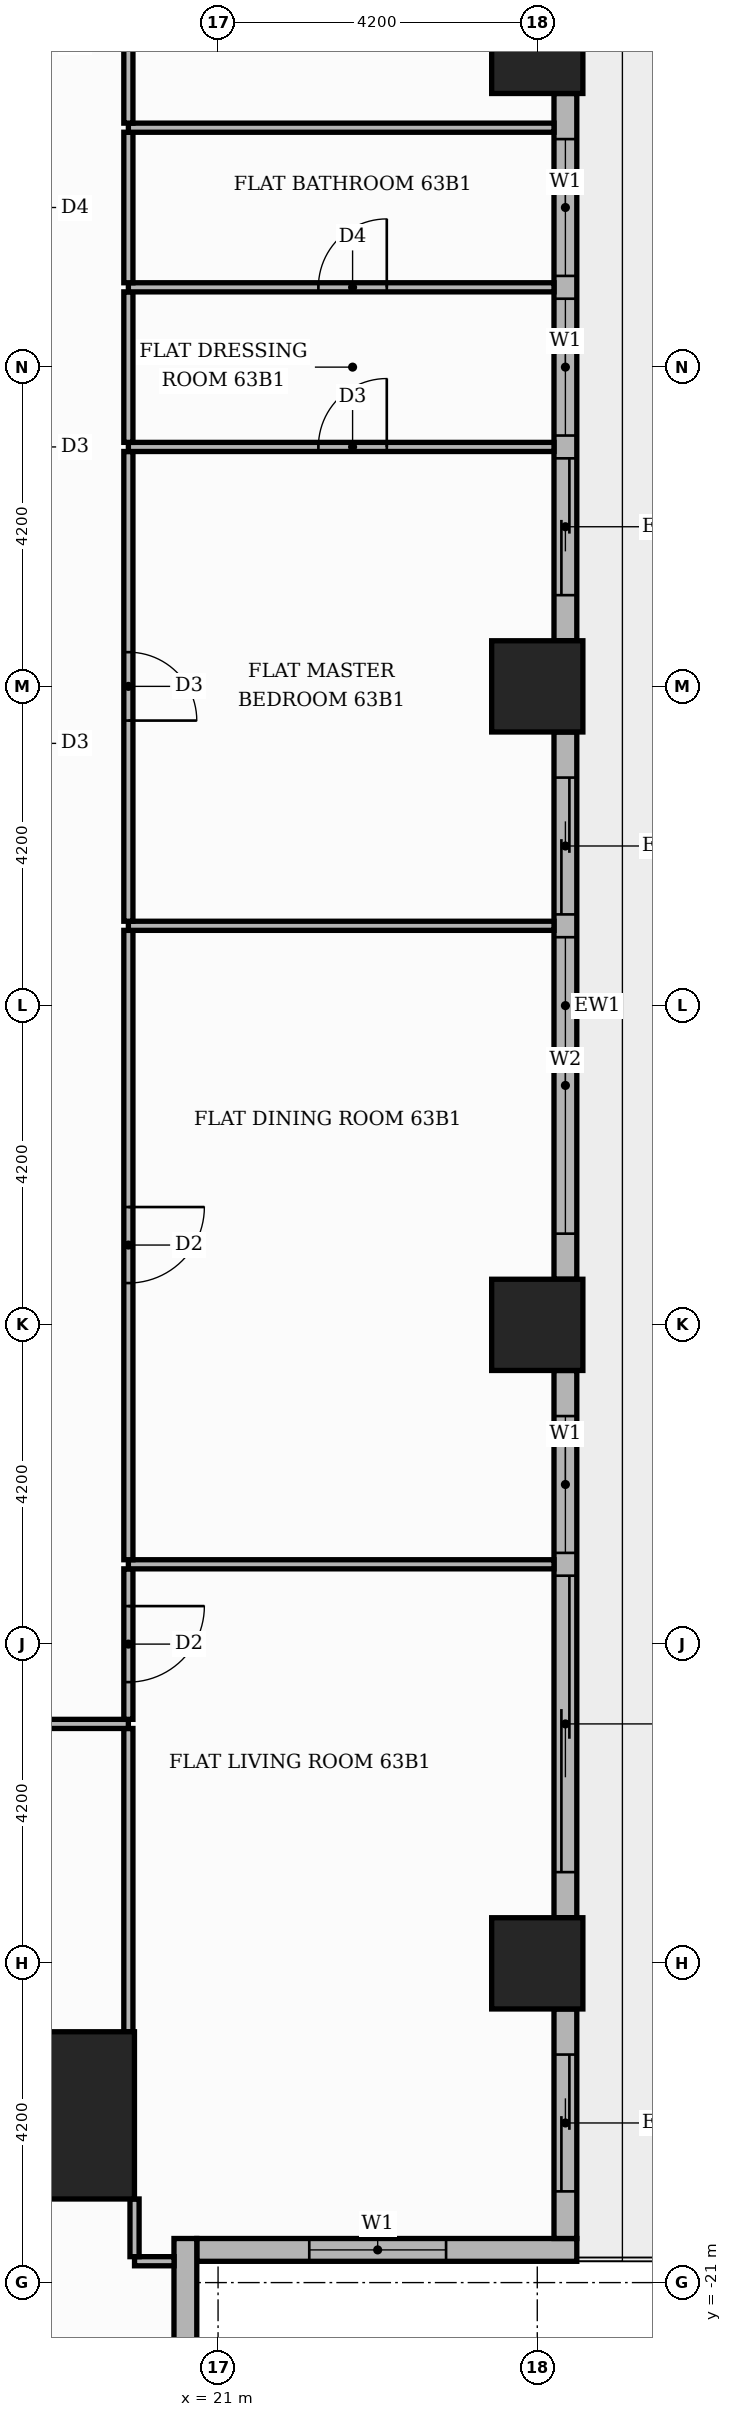
"""IFC4 building model, lengths in metres.
Left out: names, types, materials, properties, quantities, classifications, styles, units other than length and angle.
Written with IfcOpenShell. Run it as: python <this file> out.ifc"""

import sys

from ifc_helpers import new_model, si_unit, direction, frame, frame_2d, origin, origin_2d, place, context, subcontext, project, spatial, rectangle, extrude, element, fill, save


model = new_model("IFC4")
c1 = context("Model", 3, precision=1e-05, world=origin(), true_north=direction((0.0, 1.0)))
c2 = subcontext(c1, "Body", "Model", "MODEL_VIEW")
j1 = project(units=[si_unit("LENGTHUNIT", "METRE"), si_unit("PLANEANGLEUNIT", "RADIAN")], contexts=[c1])
p1 = place(None, origin())
s1 = spatial("IfcSite", under=j1, at=p1, CompositionType="ELEMENT")
p2 = place(p1, origin())
s2 = spatial("IfcBuilding", under=s1, at=p2, CompositionType="ELEMENT")
p3 = place(p2, frame((0.0, 0.0, 264.0)))
s3 = spatial("IfcBuildingStorey", under=s2, at=p3, CompositionType="ELEMENT", Elevation=264.0)
p4 = place(p3, frame((18.8, -18.8, 0.0), z_axis=(0.0, 0.0, 1.0), x_axis=(1.0, 0.0, 0.0)))
e1 = element("IfcColumn", 1, at=p4, inside=s3, PredefinedType="COLUMN", context=c2, shape_type="SweptSolid", body=[
    extrude(rectangle(XDim=2.2, YDim=2.2, at=origin_2d()), origin(), (0.0, 0.0, 1.0), 3.9),
])
for number, where, z_axis, x_axis in (
    (2, (25.2, 0.0, 0.0), (0.0, 0.0, 1.0), (1.0, 0.0, 0.0)),
    (3, (25.2, 8.4, 0.0), (0.0, 0.0, 1.0), (1.0, 0.0, 0.0)),
    (4, (25.2, -8.4, 0.0), (0.0, 0.0, 1.0), (1.0, 0.0, 0.0)),
    (5, (25.2, -16.8, 0.0), (0.0, 0.0, 1.0), (1.0, 0.0, 0.0)),
):
    element("IfcColumn", number, at=place(p3, frame(where, z_axis=z_axis, x_axis=x_axis)), inside=s3, PredefinedType="COLUMN", context=c2, shape_type="SweptSolid", body=[
        extrude(rectangle(XDim=1.2, YDim=1.2, at=origin_2d()), origin(), (0.0, 0.0, 1.0), 3.9),
    ])
p5 = place(p3, frame((20.72, -20.57, 0.0), z_axis=(0.0, 0.0, 1.0), x_axis=(1.0, 0.0, 0.0)))
e6 = element("IfcWall", 6, at=p5, inside=s3, PredefinedType="STANDARD", context=c2, shape_type="SweptSolid", body=[
    extrude(rectangle(XDim=5.0, YDim=0.3, at=frame_2d((2.5, 0.0))), origin(), (0.0, 0.0, 1.0), 3.48),
])
p6 = place(p5, frame((1.48, 0.0, 0.9)))
e7 = element("IfcOpeningElement", 7, at=p6, cuts=e6, PredefinedType="OPENING", context=c2, shape_type="SweptSolid", body=[
    extrude(rectangle(XDim=1.8, YDim=2.1, at=frame_2d((0.9, 1.05))), frame((0.0, 0.16, 0.0), z_axis=(0.0, -1.0, 0.0), x_axis=(1.0, 0.0, 0.0)), (0.0, 0.0, 1.0), 0.32),
])
p7 = place(p3, frame((25.57, -20.42, 0.0), z_axis=(0.0, 0.0, 1.0), x_axis=(0.0, 1.0, 0.0)))
e8 = element("IfcWall", 8, at=p7, inside=s3, PredefinedType="STANDARD", context=c2, shape_type="SweptSolid", body=[
    extrude(rectangle(XDim=3.02, YDim=0.3, at=frame_2d((1.51, 0.0))), origin(), (0.0, 0.0, 1.0), 3.48),
])
p8 = place(p7, frame((0.62, 0.0, 0.0)))
e9 = element("IfcOpeningElement", 9, at=p8, cuts=e8, PredefinedType="OPENING", context=c2, shape_type="SweptSolid", body=[
    extrude(rectangle(XDim=1.8, YDim=2.4, at=frame_2d((0.9, 1.2))), frame((0.0, 0.16, 0.0), z_axis=(0.0, -1.0, 0.0), x_axis=(1.0, 0.0, 0.0)), (0.0, 0.0, 1.0), 0.32),
])
p9 = place(p3, frame((25.57, -16.2, 0.0), z_axis=(0.0, 0.0, 1.0), x_axis=(0.0, 1.0, 0.0)))
e10 = element("IfcWall", 10, at=p9, inside=s3, PredefinedType="STANDARD", context=c2, shape_type="SweptSolid", body=[
    extrude(rectangle(XDim=7.2, YDim=0.3, at=frame_2d((3.6, 0.0))), origin(), (0.0, 0.0, 1.0), 3.48),
])
p10 = place(p9, frame((0.6, 0.0, 0.0)))
e11 = element("IfcOpeningElement", 11, at=p10, cuts=e10, PredefinedType="OPENING", context=c2, shape_type="SweptSolid", body=[
    extrude(rectangle(XDim=3.9, YDim=2.4, at=frame_2d((1.95, 1.2))), frame((0.0, 0.16, 0.0), z_axis=(0.0, -1.0, 0.0), x_axis=(1.0, 0.0, 0.0)), (0.0, 0.0, 1.0), 0.32),
])
p11 = place(p9, frame((4.8, 0.0, 0.9)))
e12 = element("IfcOpeningElement", 12, at=p11, cuts=e10, PredefinedType="OPENING", context=c2, shape_type="SweptSolid", body=[
    extrude(rectangle(XDim=1.8, YDim=2.1, at=frame_2d((0.9, 1.05))), frame((0.0, 0.16, 0.0), z_axis=(0.0, -1.0, 0.0), x_axis=(1.0, 0.0, 0.0)), (0.0, 0.0, 1.0), 0.32),
])
p12 = place(p3, frame((25.57, -7.8, 0.0), z_axis=(0.0, 0.0, 1.0), x_axis=(0.0, 1.0, 0.0)))
e13 = element("IfcWall", 13, at=p12, inside=s3, PredefinedType="STANDARD", context=c2, shape_type="SweptSolid", body=[
    extrude(rectangle(XDim=7.2, YDim=0.3, at=frame_2d((3.6, 0.0))), origin(), (0.0, 0.0, 1.0), 3.48),
])
p13 = place(p12, frame((0.6, 0.0, 0.9)))
e14 = element("IfcOpeningElement", 14, at=p13, cuts=e13, PredefinedType="OPENING", context=c2, shape_type="SweptSolid", body=[
    extrude(rectangle(XDim=3.9, YDim=2.1, at=frame_2d((1.95, 1.05))), frame((0.0, 0.16, 0.0), z_axis=(0.0, -1.0, 0.0), x_axis=(1.0, 0.0, 0.0)), (0.0, 0.0, 1.0), 0.32),
])
p14 = place(p12, frame((4.8, 0.0, 0.0)))
e15 = element("IfcOpeningElement", 15, at=p14, cuts=e13, PredefinedType="OPENING", context=c2, shape_type="SweptSolid", body=[
    extrude(rectangle(XDim=1.8, YDim=2.4, at=frame_2d((0.9, 1.2))), frame((0.0, 0.16, 0.0), z_axis=(0.0, -1.0, 0.0), x_axis=(1.0, 0.0, 0.0)), (0.0, 0.0, 1.0), 0.32),
])
p15 = place(p3, frame((25.57, 0.6, 0.0), z_axis=(0.0, 0.0, 1.0), x_axis=(0.0, 1.0, 0.0)))
e16 = element("IfcWall", 16, at=p15, inside=s3, PredefinedType="STANDARD", context=c2, shape_type="SweptSolid", body=[
    extrude(rectangle(XDim=7.2, YDim=0.3, at=frame_2d((3.6, 0.0))), origin(), (0.0, 0.0, 1.0), 3.48),
])
p16 = place(p15, frame((0.6, 0.0, 0.0)))
e17 = element("IfcOpeningElement", 17, at=p16, cuts=e16, PredefinedType="OPENING", context=c2, shape_type="SweptSolid", body=[
    extrude(rectangle(XDim=1.8, YDim=2.4, at=frame_2d((0.9, 1.2))), frame((0.0, 0.16, 0.0), z_axis=(0.0, -1.0, 0.0), x_axis=(1.0, 0.0, 0.0)), (0.0, 0.0, 1.0), 0.32),
])
p17 = place(p15, frame((2.7, 0.0, 0.9)))
e18 = element("IfcOpeningElement", 18, at=p17, cuts=e16, PredefinedType="OPENING", context=c2, shape_type="SweptSolid", body=[
    extrude(rectangle(XDim=1.8, YDim=2.1, at=frame_2d((0.9, 1.05))), frame((0.0, 0.16, 0.0), z_axis=(0.0, -1.0, 0.0), x_axis=(1.0, 0.0, 0.0)), (0.0, 0.0, 1.0), 0.32),
])
p18 = place(p15, frame((4.8, 0.0, 0.9)))
e19 = element("IfcOpeningElement", 19, at=p18, cuts=e16, PredefinedType="OPENING", context=c2, shape_type="SweptSolid", body=[
    extrude(rectangle(XDim=1.8, YDim=2.1, at=frame_2d((0.9, 1.05))), frame((0.0, 0.16, 0.0), z_axis=(0.0, -1.0, 0.0), x_axis=(1.0, 0.0, 0.0)), (0.0, 0.0, 1.0), 0.32),
])
p19 = place(p3, frame((20.57, -25.42, 0.0), z_axis=(0.0, 0.0, 1.0), x_axis=(0.0, 1.0, 0.0)))
e20 = element("IfcWall", 20, at=p19, inside=s3, PredefinedType="STANDARD", context=c2, shape_type="SweptSolid", body=[
    extrude(rectangle(XDim=5.0, YDim=0.3, at=frame_2d((2.5, 0.0))), origin(), (0.0, 0.0, 1.0), 3.48),
])
p20 = place(p19, frame((1.42, 0.0, 0.9)))
e21 = element("IfcOpeningElement", 21, at=p20, cuts=e20, PredefinedType="OPENING", context=c2, shape_type="SweptSolid", body=[
    extrude(rectangle(XDim=1.8, YDim=2.1, at=frame_2d((0.9, 1.05))), frame((0.0, 0.16, 0.0), z_axis=(0.0, -1.0, 0.0), x_axis=(1.0, 0.0, 0.0)), (0.0, 0.0, 1.0), 0.32),
])
p21 = place(p3, frame((19.901, -20.719, 0.0), z_axis=(0.0, 0.0, 1.0), x_axis=(1.0, 0.0, 0.0)))
e22 = element("IfcWall", 22, at=p21, inside=s3, PredefinedType="PARTITIONING", context=c2, shape_type="SweptSolid", body=[
    extrude(rectangle(XDim=0.52, YDim=0.12, at=frame_2d((0.26, 0.0))), origin(), (0.0, 0.0, 1.0), 3.48),
])
p22 = place(p3, frame((19.901, -20.659, 0.0), z_axis=(0.0, 0.0, 1.0), x_axis=(0.0, 1.0, 0.0)))
e23 = element("IfcWall", 23, at=p22, inside=s3, PredefinedType="PARTITIONING", context=c2, shape_type="SweptSolid", body=[
    extrude(rectangle(XDim=0.759, YDim=0.12, at=frame_2d((0.379, 0.0))), origin(), (0.0, 0.0, 1.0), 3.48),
])
p23 = place(p3, frame((19.82, -17.7, 0.0), z_axis=(0.0, 0.0, 1.0), x_axis=(0.0, 1.0, 0.0)))
e24 = element("IfcWall", 24, at=p23, inside=s3, PredefinedType="PARTITIONING", context=c2, shape_type="SweptSolid", body=[
    extrude(rectangle(XDim=3.99, YDim=0.12, at=frame_2d((1.995, 0.0))), origin(), (0.0, 0.0, 1.0), 3.48),
])
p24 = place(p3, frame((13.65, -13.65, 0.0), z_axis=(0.0, 0.0, 1.0), x_axis=(1.0, 0.0, 0.0)))
e25 = element("IfcWall", 25, at=p24, inside=s3, PredefinedType="PARTITIONING", context=c2, shape_type="SweptSolid", body=[
    extrude(rectangle(XDim=6.17, YDim=0.12, at=frame_2d((3.085, 0.0))), origin(), (0.0, 0.0, 1.0), 3.48),
])
p25 = place(p24, frame((2.635, 0.0, 0.0)))
e26 = element("IfcOpeningElement", 26, at=p25, cuts=e25, PredefinedType="OPENING", context=c2, shape_type="SweptSolid", body=[
    extrude(rectangle(XDim=0.9, YDim=2.1, at=frame_2d((0.45, 1.05))), frame((0.0, 0.07, 0.0), z_axis=(0.0, -1.0, 0.0), x_axis=(1.0, 0.0, 0.0)), (0.0, 0.0, 1.0), 0.14),
])
p26 = place(p3, frame((19.82, -13.59, 0.0), z_axis=(0.0, 0.0, 1.0), x_axis=(0.0, 1.0, 0.0)))
e27 = element("IfcWall", 27, at=p26, inside=s3, PredefinedType="PARTITIONING", context=c2, shape_type="SweptSolid", body=[
    extrude(rectangle(XDim=1.98, YDim=0.12, at=frame_2d((0.99, 0.0))), origin(), (0.0, 0.0, 1.0), 3.48),
])
p27 = place(p26, frame((0.49, 0.0, 0.0)))
e28 = element("IfcOpeningElement", 28, at=p27, cuts=e27, PredefinedType="OPENING", context=c2, shape_type="SweptSolid", body=[
    extrude(rectangle(XDim=1.0, YDim=2.1, at=frame_2d((0.5, 1.05))), frame((0.0, 0.07, 0.0), z_axis=(0.0, -1.0, 0.0), x_axis=(1.0, 0.0, 0.0)), (0.0, 0.0, 1.0), 0.14),
])
p28 = place(p3, frame((19.82, -11.55, 0.0), z_axis=(0.0, 0.0, 1.0), x_axis=(1.0, 0.0, 0.0)))
e29 = element("IfcWall", 29, at=p28, inside=s3, PredefinedType="PARTITIONING", context=c2, shape_type="SweptSolid", body=[
    extrude(rectangle(XDim=5.6, YDim=0.12, at=frame_2d((2.8, 0.0))), origin(), (0.0, 0.0, 1.0), 3.48),
])
p29 = place(p3, frame((19.82, -11.49, 0.0), z_axis=(0.0, 0.0, 1.0), x_axis=(0.0, 1.0, 0.0)))
e30 = element("IfcWall", 30, at=p29, inside=s3, PredefinedType="PARTITIONING", context=c2, shape_type="SweptSolid", body=[
    extrude(rectangle(XDim=8.28, YDim=0.12, at=frame_2d((4.14, 0.0))), origin(), (0.0, 0.0, 1.0), 3.48),
])
p30 = place(p29, frame((3.64, 0.0, 0.0)))
e31 = element("IfcOpeningElement", 31, at=p30, cuts=e30, PredefinedType="OPENING", context=c2, shape_type="SweptSolid", body=[
    extrude(rectangle(XDim=1.0, YDim=2.1, at=frame_2d((0.5, 1.05))), frame((0.0, 0.07, 0.0), z_axis=(0.0, -1.0, 0.0), x_axis=(1.0, 0.0, 0.0)), (0.0, 0.0, 1.0), 0.14),
])
p31 = place(p3, frame((19.82, -3.15, 0.0), z_axis=(0.0, 0.0, 1.0), x_axis=(1.0, 0.0, 0.0)))
e32 = element("IfcWall", 32, at=p31, inside=s3, PredefinedType="PARTITIONING", context=c2, shape_type="SweptSolid", body=[
    extrude(rectangle(XDim=5.6, YDim=0.12, at=frame_2d((2.8, 0.0))), origin(), (0.0, 0.0, 1.0), 3.48),
])
p32 = place(p3, frame((19.82, -3.09, 0.0), z_axis=(0.0, 0.0, 1.0), x_axis=(0.0, 1.0, 0.0)))
e33 = element("IfcWall", 33, at=p32, inside=s3, PredefinedType="PARTITIONING", context=c2, shape_type="SweptSolid", body=[
    extrude(rectangle(XDim=6.18, YDim=0.12, at=frame_2d((3.09, 0.0))), origin(), (0.0, 0.0, 1.0), 3.48),
])
p33 = place(p32, frame((2.64, 0.0, 0.0)))
e34 = element("IfcOpeningElement", 34, at=p33, cuts=e33, PredefinedType="OPENING", context=c2, shape_type="SweptSolid", body=[
    extrude(rectangle(XDim=0.9, YDim=2.1, at=frame_2d((0.45, 1.05))), frame((0.0, 0.07, 0.0), z_axis=(0.0, -1.0, 0.0), x_axis=(1.0, 0.0, 0.0)), (0.0, 0.0, 1.0), 0.14),
])
p34 = place(p3, frame((19.82, 3.15, 0.0), z_axis=(0.0, 0.0, 1.0), x_axis=(1.0, 0.0, 0.0)))
e35 = element("IfcWall", 35, at=p34, inside=s3, PredefinedType="PARTITIONING", context=c2, shape_type="SweptSolid", body=[
    extrude(rectangle(XDim=5.6, YDim=0.12, at=frame_2d((2.8, 0.0))), origin(), (0.0, 0.0, 1.0), 3.48),
])
p35 = place(p34, frame((2.5, 0.0, 0.0)))
e36 = element("IfcOpeningElement", 36, at=p35, cuts=e35, PredefinedType="OPENING", context=c2, shape_type="SweptSolid", body=[
    extrude(rectangle(XDim=0.9, YDim=2.1, at=frame_2d((0.45, 1.05))), frame((0.0, 0.07, 0.0), z_axis=(0.0, -1.0, 0.0), x_axis=(1.0, 0.0, 0.0)), (0.0, 0.0, 1.0), 0.14),
])
p36 = place(p3, frame((19.82, 3.21, 0.0), z_axis=(0.0, 0.0, 1.0), x_axis=(0.0, 1.0, 0.0)))
e37 = element("IfcWall", 37, at=p36, inside=s3, PredefinedType="PARTITIONING", context=c2, shape_type="SweptSolid", body=[
    extrude(rectangle(XDim=1.98, YDim=0.12, at=frame_2d((0.99, 0.0))), origin(), (0.0, 0.0, 1.0), 3.48),
])
p37 = place(p3, frame((19.82, 5.25, 0.0), z_axis=(0.0, 0.0, 1.0), x_axis=(1.0, 0.0, 0.0)))
e38 = element("IfcWall", 38, at=p37, inside=s3, PredefinedType="PARTITIONING", context=c2, shape_type="SweptSolid", body=[
    extrude(rectangle(XDim=5.6, YDim=0.12, at=frame_2d((2.8, 0.0))), origin(), (0.0, 0.0, 1.0), 3.48),
])
p38 = place(p37, frame((2.5, 0.0, 0.0)))
e39 = element("IfcOpeningElement", 39, at=p38, cuts=e38, PredefinedType="OPENING", context=c2, shape_type="SweptSolid", body=[
    extrude(rectangle(XDim=0.9, YDim=2.1, at=frame_2d((0.45, 1.05))), frame((0.0, 0.07, 0.0), z_axis=(0.0, -1.0, 0.0), x_axis=(1.0, 0.0, 0.0)), (0.0, 0.0, 1.0), 0.14),
])
p39 = place(p3, frame((19.82, 5.31, 0.0), z_axis=(0.0, 0.0, 1.0), x_axis=(0.0, 1.0, 0.0)))
e40 = element("IfcWall", 40, at=p39, inside=s3, PredefinedType="PARTITIONING", context=c2, shape_type="SweptSolid", body=[
    extrude(rectangle(XDim=1.98, YDim=0.12, at=frame_2d((0.99, 0.0))), origin(), (0.0, 0.0, 1.0), 3.48),
])
p40 = place(p3, frame((19.82, 7.35, 0.0), z_axis=(0.0, 0.0, 1.0), x_axis=(1.0, 0.0, 0.0)))
e41 = element("IfcWall", 41, at=p40, inside=s3, PredefinedType="PARTITIONING", context=c2, shape_type="SweptSolid", body=[
    extrude(rectangle(XDim=5.6, YDim=0.12, at=frame_2d((2.8, 0.0))), origin(), (0.0, 0.0, 1.0), 3.48),
])
p41 = place(p3, frame((19.82, 7.41, 0.0), z_axis=(0.0, 0.0, 1.0), x_axis=(0.0, 1.0, 0.0)))
e42 = element("IfcWall", 42, at=p41, inside=s3, PredefinedType="PARTITIONING", context=c2, shape_type="SweptSolid", body=[
    extrude(rectangle(XDim=4.08, YDim=0.12, at=frame_2d((2.04, 0.0))), origin(), (0.0, 0.0, 1.0), 3.48),
])
p42 = place(p41, frame((1.59, 0.0, 0.0)))
e43 = element("IfcOpeningElement", 43, at=p42, cuts=e42, PredefinedType="OPENING", context=c2, shape_type="SweptSolid", body=[
    extrude(rectangle(XDim=0.9, YDim=2.1, at=frame_2d((0.45, 1.05))), frame((0.0, 0.07, 0.0), z_axis=(0.0, -1.0, 0.0), x_axis=(1.0, 0.0, 0.0)), (0.0, 0.0, 1.0), 0.14),
])
p43 = place(p6, origin())
e44 = element("IfcWindow", 44, at=p43, inside=s3, PartitioningType="SINGLE_PANEL", PredefinedType="WINDOW", context=c2, shape_type="SweptSolid", body=[
    extrude(rectangle(XDim=1.8, YDim=2.1, at=frame_2d((0.9, 1.05))), frame((0.0, 0.03, 0.0), z_axis=(0.0, -1.0, 0.0), x_axis=(1.0, 0.0, 0.0)), (0.0, 0.0, 1.0), 0.06),
])
fill(e7, e44)
p44 = place(p8, origin())
e45 = element("IfcDoor", 45, at=p44, inside=s3, OperationType="SLIDING_TO_RIGHT", PredefinedType="DOOR", context=c2, shape_type="SweptSolid", body=[
    extrude(rectangle(XDim=1.8, YDim=2.4, at=frame_2d((0.9, 1.2))), frame((0.0, 0.025, 0.0), z_axis=(0.0, -1.0, 0.0), x_axis=(1.0, 0.0, 0.0)), (0.0, 0.0, 1.0), 0.05),
])
fill(e9, e45)
p45 = place(p10, origin())
e46 = element("IfcDoor", 46, at=p45, inside=s3, OperationType="SLIDING_TO_LEFT", PredefinedType="DOOR", context=c2, shape_type="SweptSolid", body=[
    extrude(rectangle(XDim=3.9, YDim=2.4, at=frame_2d((1.95, 1.2))), frame((0.0, 0.025, 0.0), z_axis=(0.0, -1.0, 0.0), x_axis=(1.0, 0.0, 0.0)), (0.0, 0.0, 1.0), 0.05),
])
fill(e11, e46)
p46 = place(p11, origin())
e47 = element("IfcWindow", 47, at=p46, inside=s3, PartitioningType="SINGLE_PANEL", PredefinedType="WINDOW", context=c2, shape_type="SweptSolid", body=[
    extrude(rectangle(XDim=1.8, YDim=2.1, at=frame_2d((0.9, 1.05))), frame((0.0, 0.03, 0.0), z_axis=(0.0, -1.0, 0.0), x_axis=(1.0, 0.0, 0.0)), (0.0, 0.0, 1.0), 0.06),
])
fill(e12, e47)
p47 = place(p13, origin())
e48 = element("IfcWindow", 48, at=p47, inside=s3, PartitioningType="SINGLE_PANEL", PredefinedType="WINDOW", context=c2, shape_type="SweptSolid", body=[
    extrude(rectangle(XDim=3.9, YDim=2.1, at=frame_2d((1.95, 1.05))), frame((0.0, 0.03, 0.0), z_axis=(0.0, -1.0, 0.0), x_axis=(1.0, 0.0, 0.0)), (0.0, 0.0, 1.0), 0.06),
])
fill(e14, e48)
p48 = place(p14, origin())
e49 = element("IfcDoor", 49, at=p48, inside=s3, OperationType="SLIDING_TO_RIGHT", PredefinedType="DOOR", context=c2, shape_type="SweptSolid", body=[
    extrude(rectangle(XDim=1.8, YDim=2.4, at=frame_2d((0.9, 1.2))), frame((0.0, 0.025, 0.0), z_axis=(0.0, -1.0, 0.0), x_axis=(1.0, 0.0, 0.0)), (0.0, 0.0, 1.0), 0.05),
])
fill(e15, e49)
p49 = place(p16, origin())
e50 = element("IfcDoor", 50, at=p49, inside=s3, OperationType="SLIDING_TO_LEFT", PredefinedType="DOOR", context=c2, shape_type="SweptSolid", body=[
    extrude(rectangle(XDim=1.8, YDim=2.4, at=frame_2d((0.9, 1.2))), frame((0.0, 0.025, 0.0), z_axis=(0.0, -1.0, 0.0), x_axis=(1.0, 0.0, 0.0)), (0.0, 0.0, 1.0), 0.05),
])
fill(e17, e50)
p50 = place(p17, origin())
e51 = element("IfcWindow", 51, at=p50, inside=s3, PartitioningType="SINGLE_PANEL", PredefinedType="WINDOW", context=c2, shape_type="SweptSolid", body=[
    extrude(rectangle(XDim=1.8, YDim=2.1, at=frame_2d((0.9, 1.05))), frame((0.0, 0.03, 0.0), z_axis=(0.0, -1.0, 0.0), x_axis=(1.0, 0.0, 0.0)), (0.0, 0.0, 1.0), 0.06),
])
fill(e18, e51)
p51 = place(p18, origin())
e52 = element("IfcWindow", 52, at=p51, inside=s3, PartitioningType="SINGLE_PANEL", PredefinedType="WINDOW", context=c2, shape_type="SweptSolid", body=[
    extrude(rectangle(XDim=1.8, YDim=2.1, at=frame_2d((0.9, 1.05))), frame((0.0, 0.03, 0.0), z_axis=(0.0, -1.0, 0.0), x_axis=(1.0, 0.0, 0.0)), (0.0, 0.0, 1.0), 0.06),
])
fill(e19, e52)
p52 = place(p27, frame((1.0, 0.0, 0.0), z_axis=(0.0, 0.0, 1.0), x_axis=(-1.0, 0.0, 0.0)))
e53 = element("IfcDoor", 53, at=p52, inside=s3, OperationType="SINGLE_SWING_RIGHT", PredefinedType="DOOR", context=c2, shape_type="SweptSolid", body=[
    extrude(rectangle(XDim=1.0, YDim=2.1, at=frame_2d((0.5, 1.05))), frame((0.0, 0.025, 0.0), z_axis=(0.0, -1.0, 0.0), x_axis=(1.0, 0.0, 0.0)), (0.0, 0.0, 1.0), 0.05),
])
fill(e28, e53)
p53 = place(p30, frame((1.0, 0.0, 0.0), z_axis=(0.0, 0.0, 1.0), x_axis=(-1.0, 0.0, 0.0)))
e54 = element("IfcDoor", 54, at=p53, inside=s3, OperationType="SINGLE_SWING_RIGHT", PredefinedType="DOOR", context=c2, shape_type="SweptSolid", body=[
    extrude(rectangle(XDim=1.0, YDim=2.1, at=frame_2d((0.5, 1.05))), frame((0.0, 0.025, 0.0), z_axis=(0.0, -1.0, 0.0), x_axis=(1.0, 0.0, 0.0)), (0.0, 0.0, 1.0), 0.05),
])
fill(e31, e54)
p54 = place(p33, frame((0.9, 0.0, 0.0), z_axis=(0.0, 0.0, 1.0), x_axis=(-1.0, 0.0, 0.0)))
e55 = element("IfcDoor", 55, at=p54, inside=s3, OperationType="SINGLE_SWING_LEFT", PredefinedType="DOOR", context=c2, shape_type="SweptSolid", body=[
    extrude(rectangle(XDim=0.9, YDim=2.1, at=frame_2d((0.45, 1.05))), frame((0.0, 0.025, 0.0), z_axis=(0.0, -1.0, 0.0), x_axis=(1.0, 0.0, 0.0)), (0.0, 0.0, 1.0), 0.05),
])
fill(e34, e55)
p55 = place(p35, origin())
e56 = element("IfcDoor", 56, at=p55, inside=s3, OperationType="SINGLE_SWING_RIGHT", PredefinedType="DOOR", context=c2, shape_type="SweptSolid", body=[
    extrude(rectangle(XDim=0.9, YDim=2.1, at=frame_2d((0.45, 1.05))), frame((0.0, 0.025, 0.0), z_axis=(0.0, -1.0, 0.0), x_axis=(1.0, 0.0, 0.0)), (0.0, 0.0, 1.0), 0.05),
])
fill(e36, e56)
p56 = place(p38, origin())
e57 = element("IfcDoor", 57, at=p56, inside=s3, OperationType="SINGLE_SWING_RIGHT", PredefinedType="DOOR", context=c2, shape_type="SweptSolid", body=[
    extrude(rectangle(XDim=0.9, YDim=2.1, at=frame_2d((0.45, 1.05))), frame((0.0, 0.025, 0.0), z_axis=(0.0, -1.0, 0.0), x_axis=(1.0, 0.0, 0.0)), (0.0, 0.0, 1.0), 0.05),
])
fill(e39, e57)
save(model, sys.argv[1])
